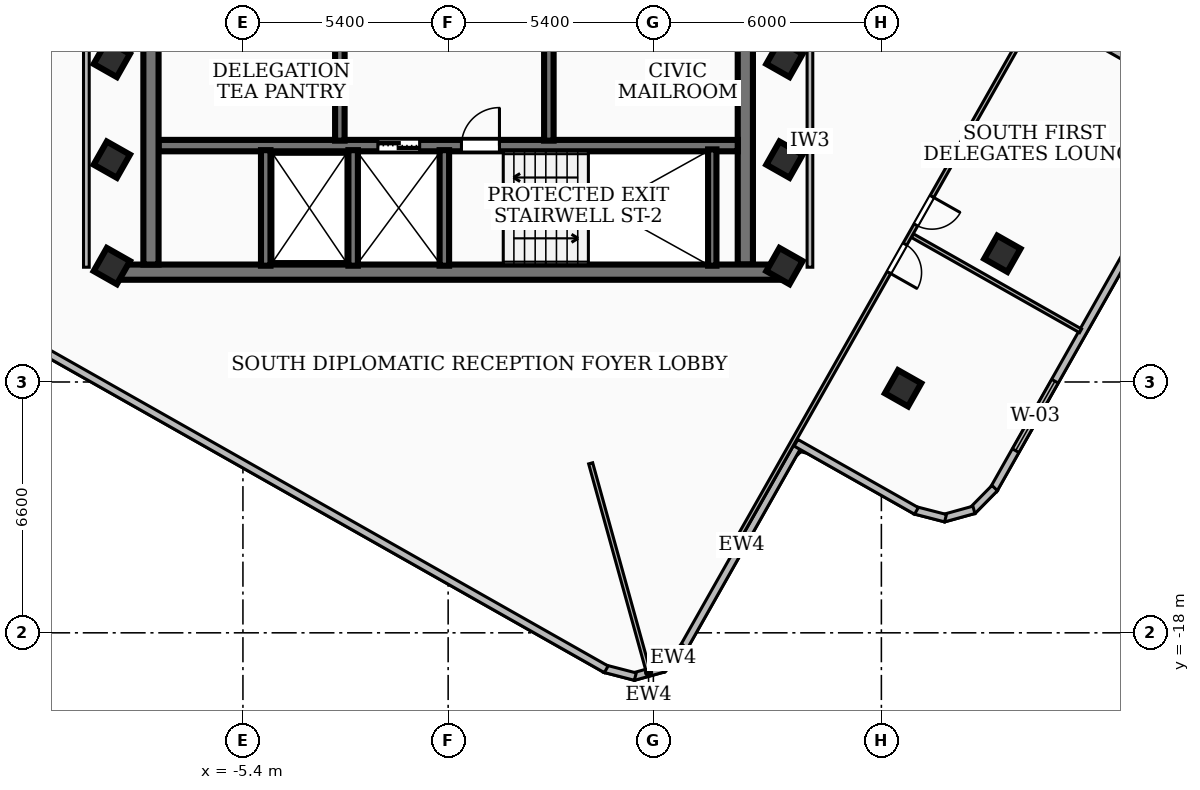
"""IFC4 building model, lengths in metres.
Left out: names, types, materials, properties, quantities, classifications, styles, units other than length and angle.
Written with IfcOpenShell. Run it as: python <this file> out.ifc"""

import sys

from ifc_helpers import new_model, si_unit, direction, frame, frame_2d, origin, origin_2d, place, context, subcontext, project, spatial, rectangle, extrude, element, fill, save


model = new_model("IFC4")
c1 = context("Model", 3, precision=1e-05, world=origin(), true_north=direction((0.0, 1.0)))
c2 = subcontext(c1, "Body", "Model", "MODEL_VIEW")
j1 = project(units=[si_unit("LENGTHUNIT", "METRE"), si_unit("PLANEANGLEUNIT", "RADIAN")], contexts=[c1])
p1 = place(None, origin())
s1 = spatial("IfcSite", under=j1, at=p1, CompositionType="ELEMENT")
p2 = place(p1, origin())
s2 = spatial("IfcBuilding", under=s1, at=p2, CompositionType="ELEMENT")
p3 = place(p2, frame((0.0, 0.0, 281.7)))
s3 = spatial("IfcBuildingStorey", under=s2, at=p3, CompositionType="ELEMENT", Elevation=281.7)
p4 = place(p3, frame((8.78, -8.51, 0.0), z_axis=(0.0, 0.0, 1.0), x_axis=(-1.0, 0.0, 0.0)))
e1 = element("IfcWall", 1, at=p4, inside=s3, PredefinedType="SHEAR", context=c2, shape_type="SweptSolid", body=[
    extrude(rectangle(XDim=17.56, YDim=0.4, at=frame_2d((8.78, 0.0))), origin(), (0.0, 0.0, 1.0), 3.12),
])
for number, where, z_axis, x_axis in (
    (2, (-7.82, -8.31, 0.0), (0.0, 0.0, 1.0), (0.0, 1.0, 0.0)),
    (3, (7.82, -1.95, 0.0), (0.0, 0.0, 1.0), (0.0, -1.0, 0.0)),
):
    element("IfcWall", number, at=place(p3, frame(where, z_axis=z_axis, x_axis=x_axis)), inside=s3, PredefinedType="SHEAR", context=c2, shape_type="SweptSolid", body=[
        extrude(rectangle(XDim=6.36, YDim=0.4, at=frame_2d((3.18, 0.0))), origin(), (0.0, 0.0, 1.0), 3.12),
    ])
p5 = place(p3, frame((-7.62, -5.18, 0.0), z_axis=(0.0, 0.0, 1.0), x_axis=(1.0, 0.0, 0.0)))
e4 = element("IfcWall", 4, at=p5, inside=s3, PredefinedType="SOLIDWALL", context=c2, shape_type="SweptSolid", body=[
    extrude(rectangle(XDim=15.24, YDim=0.3, at=frame_2d((7.62, 0.0))), origin(), (0.0, 0.0, 1.0), 3.12),
])
p6 = place(p5, frame((5.77, 0.0, 0.0)))
e5 = element("IfcOpeningElement", 5, at=p6, cuts=e4, PredefinedType="OPENING", context=c2, shape_type="SweptSolid", body=[
    extrude(rectangle(XDim=1.1, YDim=2.15, at=frame_2d((0.55, 1.075))), frame((0.0, 0.16, 0.0), z_axis=(0.0, -1.0, 0.0), x_axis=(1.0, 0.0, 0.0)), (0.0, 0.0, 1.0), 0.32),
])
p7 = place(p5, frame((7.97, 0.0, 0.0)))
e6 = element("IfcOpeningElement", 6, at=p7, cuts=e4, PredefinedType="OPENING", context=c2, shape_type="SweptSolid", body=[
    extrude(rectangle(XDim=1.0, YDim=2.1, at=frame_2d((0.5, 1.05))), frame((0.0, 0.16, 0.0), z_axis=(0.0, -1.0, 0.0), x_axis=(1.0, 0.0, 0.0)), (0.0, 0.0, 1.0), 0.32),
])
p8 = place(p3, frame((6.95, -8.34, 0.0), z_axis=(0.0, 0.0, 1.0), x_axis=(0.0, 1.0, 0.0)))
e7 = element("IfcWall", 7, at=p8, inside=s3, PredefinedType="SOLIDWALL", context=c2, shape_type="SweptSolid", body=[
    extrude(rectangle(XDim=3.06, YDim=0.22, at=frame_2d((1.53, 0.0))), origin(), (0.0, 0.0, 1.0), 3.12),
])
for number, where, z_axis, x_axis in (
    (8, (-0.1, -8.34, 0.0), (0.0, 0.0, 1.0), (0.0, 1.0, 0.0)),
    (9, (-2.5, -8.34, 0.0), (0.0, 0.0, 1.0), (0.0, 1.0, 0.0)),
    (10, (-4.8, -8.34, 0.0), (0.0, 0.0, 1.0), (0.0, 1.0, 0.0)),
):
    element("IfcWall", number, at=place(p3, frame(where, z_axis=z_axis, x_axis=x_axis)), inside=s3, PredefinedType="SOLIDWALL", context=c2, shape_type="SweptSolid", body=[
        extrude(rectangle(XDim=3.04, YDim=0.25, at=frame_2d((1.52, 0.0))), origin(), (0.0, 0.0, 1.0), 3.12),
    ])
for number, where, z_axis, x_axis in (
    (11, (-2.85, -5.05, 0.0), (0.0, 0.0, 1.0), (0.0, 1.0, 0.0)),
    (12, (2.65, -5.05, 0.0), (0.0, 0.0, 1.0), (0.0, 1.0, 0.0)),
):
    element("IfcWall", number, at=place(p3, frame(where, z_axis=z_axis, x_axis=x_axis)), inside=s3, PredefinedType="SOLIDWALL", context=c2, shape_type="SweptSolid", body=[
        extrude(rectangle(XDim=3.07, YDim=0.25, at=frame_2d((1.535, 0.0))), origin(), (0.0, 0.0, 1.0), 3.12),
    ])
for number, where, z_axis, x_axis in (
    (13, (-8.85, -5.55, 0.0), (0.0, 0.0, 1.0), (0.493, 0.87, 0.0)),
    (14, (-8.85, -2.9, 0.0), (0.0, 0.0, 1.0), (0.493, 0.87, 0.0)),
    (15, (8.85, -5.55, 0.0), (0.0, 0.0, 1.0), (0.493, 0.87, 0.0)),
    (16, (8.85, -2.9, 0.0), (0.0, 0.0, 1.0), (0.493, 0.87, 0.0)),
    (17, (8.85, -8.35, 0.0), (0.0, 0.0, 1.0), (0.493, 0.87, 0.0)),
    (18, (-8.85, -8.35, 0.0), (0.0, 0.0, 1.0), (0.493, 0.87, 0.0)),
    (19, (11.971, -11.566, 0.0), (0.0, 0.0, 1.0), (0.493, 0.87, 0.0)),
    (20, (14.583, -8.026, 0.0), (0.0, 0.0, 1.0), (0.493, 0.87, 0.0)),
):
    element("IfcColumn", number, at=place(p3, frame(where, z_axis=z_axis, x_axis=x_axis)), inside=s3, PredefinedType="COLUMN", context=c2, shape_type="SweptSolid", body=[
        extrude(rectangle(XDim=0.7, YDim=0.7, at=origin_2d()), origin(), (0.0, 0.0, 1.0), 3.42),
    ])
p9 = place(p3, frame((9.262, -12.968, 0.0), z_axis=(0.0, 0.0, 1.0), x_axis=(-0.492583125855, -0.87026539867, 0.0)))
e21 = element("IfcWall", 21, at=p9, inside=s3, PredefinedType="SOLIDWALL", context=c2, shape_type="SweptSolid", body=[
    extrude(rectangle(XDim=6.24, YDim=0.2, at=frame_2d((3.12, 0.0))), origin(), (0.0, 0.0, 1.0), 3.12),
])
p10 = place(p3, frame((6.218, -18.359, 0.0), z_axis=(0.0, 0.0, 1.0), x_axis=(-0.701706468749, -0.712466161804, 0.0)))
e22 = element("IfcWall", 22, at=p10, inside=s3, PredefinedType="SOLIDWALL", context=c2, shape_type="SweptSolid", body=[
    extrude(rectangle(XDim=0.84, YDim=0.2, at=frame_2d((0.42, 0.0))), origin(), (0.0, 0.0, 1.0), 3.12),
])
p11 = place(p3, frame((5.671, -18.932, 0.0), z_axis=(0.0, 0.0, 1.0), x_axis=(-0.963313924885, -0.268377126675, 0.0)))
e23 = element("IfcWall", 23, at=p11, inside=s3, PredefinedType="SOLIDWALL", context=c2, shape_type="SweptSolid", body=[
    extrude(rectangle(XDim=0.824, YDim=0.2, at=frame_2d((0.412, 0.0))), origin(), (0.0, 0.0, 1.0), 3.12),
])
p12 = place(p3, frame((4.925, -19.152, 0.0), z_axis=(0.0, 0.0, 1.0), x_axis=(-0.968015248239, 0.250891369276, 0.0)))
e24 = element("IfcWall", 24, at=p12, inside=s3, PredefinedType="SOLIDWALL", context=c2, shape_type="SweptSolid", body=[
    extrude(rectangle(XDim=0.838, YDim=0.2, at=frame_2d((0.419, 0.0))), origin(), (0.0, 0.0, 1.0), 3.12),
])
p13 = place(p3, frame((4.16, -18.96, 0.0), z_axis=(0.0, 0.0, 1.0), x_axis=(-0.870210232131, 0.492680577956, 0.0)))
e25 = element("IfcWall", 25, at=p13, inside=s3, PredefinedType="SOLIDWALL", context=c2, shape_type="SweptSolid", body=[
    extrude(rectangle(XDim=25.923, YDim=0.2, at=frame_2d((12.962, 0.0))), origin(), (0.0, 0.0, 1.0), 3.12),
])
p14 = place(p13, frame((19.32, 0.0, 0.85)))
e26 = element("IfcOpeningElement", 26, at=p14, cuts=e25, PredefinedType="OPENING", context=c2, shape_type="SweptSolid", body=[
    extrude(rectangle(XDim=1.8, YDim=1.6, at=frame_2d((0.9, 0.8))), frame((0.0, 0.11, 0.0), z_axis=(0.0, -1.0, 0.0), x_axis=(1.0, 0.0, 0.0)), (0.0, 0.0, 1.0), 0.22),
])
p15 = place(p3, frame((15.609, -1.599, 0.0), z_axis=(0.0, 0.0, 1.0), x_axis=(0.87036421417, -0.49240850388, 0.0)))
e27 = element("IfcWall", 27, at=p15, inside=s3, PredefinedType="SOLIDWALL", context=c2, shape_type="SweptSolid", body=[
    extrude(rectangle(XDim=3.641, YDim=0.2, at=frame_2d((1.821, 0.0))), origin(), (0.0, 0.0, 1.0), 3.12),
])
p16 = place(p3, frame((19.339, -5.421, 0.0), z_axis=(0.0, 0.0, 1.0), x_axis=(-0.492615794655, -0.870246906835, 0.0)))
e28 = element("IfcWall", 28, at=p16, inside=s3, PredefinedType="SOLIDWALL", context=c2, shape_type="SweptSolid", body=[
    extrude(rectangle(XDim=10.124, YDim=0.2, at=frame_2d((5.062, 0.0))), origin(), (0.0, 0.0, 1.0), 3.12),
])
p17 = place(p16, frame((6.846, 0.0, 0.85)))
e29 = element("IfcOpeningElement", 29, at=p17, cuts=e28, PredefinedType="OPENING", context=c2, shape_type="SweptSolid", body=[
    extrude(rectangle(XDim=2.1, YDim=2.0, at=frame_2d((1.05, 1.0))), frame((0.0, 0.11, 0.0), z_axis=(0.0, -1.0, 0.0), x_axis=(1.0, 0.0, 0.0)), (0.0, 0.0, 1.0), 0.22),
])
p18 = place(p3, frame((14.382, -14.191, 0.0), z_axis=(0.0, 0.0, 1.0), x_axis=(-0.701706468749, -0.712466161804, 0.0)))
e30 = element("IfcWall", 30, at=p18, inside=s3, PredefinedType="SOLIDWALL", context=c2, shape_type="SweptSolid", body=[
    extrude(rectangle(XDim=0.84, YDim=0.2, at=frame_2d((0.42, 0.0))), origin(), (0.0, 0.0, 1.0), 3.12),
])
p19 = place(p3, frame((13.835, -14.764, 0.0), z_axis=(0.0, 0.0, 1.0), x_axis=(-0.963780368541, -0.266697208862, 0.0)))
e31 = element("IfcWall", 31, at=p19, inside=s3, PredefinedType="SOLIDWALL", context=c2, shape_type="SweptSolid", body=[
    extrude(rectangle(XDim=0.825, YDim=0.2, at=frame_2d((0.412, 0.0))), origin(), (0.0, 0.0, 1.0), 3.12),
])
p20 = place(p3, frame((13.088, -14.983, 0.0), z_axis=(0.0, 0.0, 1.0), x_axis=(-0.968350107443, 0.249595812096, 0.0)))
e32 = element("IfcWall", 32, at=p20, inside=s3, PredefinedType="SOLIDWALL", context=c2, shape_type="SweptSolid", body=[
    extrude(rectangle(XDim=0.837, YDim=0.2, at=frame_2d((0.419, 0.0))), origin(), (0.0, 0.0, 1.0), 3.12),
])
p21 = place(p3, frame((12.323, -14.792, 0.0), z_axis=(0.0, 0.0, 1.0), x_axis=(-0.870412972764, 0.492322309918, 0.0)))
e33 = element("IfcWall", 33, at=p21, inside=s3, PredefinedType="SOLIDWALL", context=c2, shape_type="SweptSolid", body=[
    extrude(rectangle(XDim=3.642, YDim=0.2, at=frame_2d((1.821, 0.0))), origin(), (0.0, 0.0, 1.0), 3.12),
])
p22 = place(p3, frame((-9.52, -8.38, 0.0), z_axis=(0.0, 0.0, 1.0), x_axis=(0.0, 1.0, 0.0)))
e34 = element("IfcWall", 34, at=p22, inside=s3, PredefinedType="PARTITIONING", context=c2, shape_type="SweptSolid", body=[
    extrude(rectangle(XDim=6.63, YDim=0.15, at=frame_2d((3.315, 0.0))), origin(), (0.0, 0.0, 1.0), 3.12),
])
p23 = place(p3, frame((9.52, -8.38, 0.0), z_axis=(0.0, 0.0, 1.0), x_axis=(0.0, 1.0, 0.0)))
e35 = element("IfcWall", 35, at=p23, inside=s3, PredefinedType="PARTITIONING", context=c2, shape_type="SweptSolid", body=[
    extrude(rectangle(XDim=6.63, YDim=0.15, at=frame_2d((3.315, 0.0))), origin(), (0.0, 0.0, 1.0), 2.49),
])
p24 = place(p3, frame((3.75, -13.54, 0.0), z_axis=(0.0, 0.0, 1.0), x_axis=(0.266822842302, -0.963745594452, 0.0)))
e36 = element("IfcWall", 36, at=p24, inside=s3, PredefinedType="PARTITIONING", context=c2, shape_type="SweptSolid", body=[
    extrude(rectangle(XDim=5.645, YDim=0.11, at=frame_2d((2.822, 0.0))), origin(), (0.0, 0.0, 1.0), 3.12),
])
p25 = place(p3, frame((12.216, -7.549, 0.0), z_axis=(0.0, 0.0, 1.0), x_axis=(0.870245204201, -0.492618802488, 0.0)))
e37 = element("IfcWall", 37, at=p25, inside=s3, PredefinedType="PARTITIONING", context=c2, shape_type="SweptSolid", body=[
    extrude(rectangle(XDim=5.085, YDim=0.11, at=frame_2d((2.542, 0.0))), origin(), (0.0, 0.0, 1.0), 2.49),
])
p26 = place(p3, frame((17.619, 2.113, 0.0), z_axis=(0.0, 0.0, 1.0), x_axis=(-0.492746831558, -0.870172718482, 0.0)))
e38 = element("IfcWall", 38, at=p26, inside=s3, PredefinedType="PARTITIONING", context=c2, shape_type="SweptSolid", body=[
    extrude(rectangle(XDim=20.54, YDim=0.11, at=frame_2d((10.27, 0.0))), origin(), (0.0, 0.0, 1.0), 2.49),
])
p27 = place(p26, frame((11.36, 0.0, 0.0)))
e39 = element("IfcOpeningElement", 39, at=p27, cuts=e38, PredefinedType="OPENING", context=c2, shape_type="SweptSolid", body=[
    extrude(rectangle(XDim=0.86, YDim=2.04, at=frame_2d((0.43, 1.02))), frame((0.0, 0.065, 0.0), z_axis=(0.0, -1.0, 0.0), x_axis=(1.0, 0.0, 0.0)), (0.0, 0.0, 1.0), 0.13),
])
p28 = place(p26, frame((9.92, 0.0, 0.0)))
e40 = element("IfcOpeningElement", 40, at=p28, cuts=e38, PredefinedType="OPENING", context=c2, shape_type="SweptSolid", body=[
    extrude(rectangle(XDim=0.86, YDim=2.04, at=frame_2d((0.43, 1.02))), frame((0.0, 0.065, 0.0), z_axis=(0.0, -1.0, 0.0), x_axis=(1.0, 0.0, 0.0)), (0.0, 0.0, 1.0), 0.13),
])
p29 = place(p17, origin())
e41 = element("IfcWindow", 41, at=p29, inside=s3, PartitioningType="SINGLE_PANEL", PredefinedType="WINDOW", context=c2, shape_type="SweptSolid", body=[
    extrude(rectangle(XDim=2.1, YDim=2.0, at=frame_2d((1.05, 1.0))), frame((0.0, 0.03, 0.0), z_axis=(0.0, -1.0, 0.0), x_axis=(1.0, 0.0, 0.0)), (0.0, 0.0, 1.0), 0.06),
])
fill(e29, e41)
p30 = place(p6, origin())
e42 = element("IfcDoor", 42, at=p30, inside=s3, OperationType="DOUBLE_DOOR_SLIDING", PredefinedType="DOOR", context=c2, shape_type="SweptSolid", body=[
    extrude(rectangle(XDim=1.1, YDim=2.15, at=frame_2d((0.55, 1.075))), frame((0.0, 0.025, 0.0), z_axis=(0.0, -1.0, 0.0), x_axis=(1.0, 0.0, 0.0)), (0.0, 0.0, 1.0), 0.05),
])
fill(e5, e42)
p31 = place(p7, origin())
e43 = element("IfcDoor", 43, at=p31, inside=s3, OperationType="SINGLE_SWING_RIGHT", PredefinedType="DOOR", context=c2, shape_type="SweptSolid", body=[
    extrude(rectangle(XDim=1.0, YDim=2.1, at=frame_2d((0.5, 1.05))), frame((0.0, 0.025, 0.0), z_axis=(0.0, -1.0, 0.0), x_axis=(1.0, 0.0, 0.0)), (0.0, 0.0, 1.0), 0.05),
])
fill(e6, e43)
p32 = place(p27, origin())
e44 = element("IfcDoor", 44, at=p32, inside=s3, OperationType="SINGLE_SWING_RIGHT", PredefinedType="DOOR", context=c2, shape_type="SweptSolid", body=[
    extrude(rectangle(XDim=0.86, YDim=2.04, at=frame_2d((0.43, 1.02))), frame((0.0, 0.025, 0.0), z_axis=(0.0, -1.0, 0.0), x_axis=(1.0, 0.0, 0.0)), (0.0, 0.0, 1.0), 0.05),
])
fill(e39, e44)
p33 = place(p28, origin())
e45 = element("IfcDoor", 45, at=p33, inside=s3, OperationType="SINGLE_SWING_LEFT", PredefinedType="DOOR", context=c2, shape_type="SweptSolid", body=[
    extrude(rectangle(XDim=0.86, YDim=2.04, at=frame_2d((0.43, 1.02))), frame((0.0, 0.025, 0.0), z_axis=(0.0, -1.0, 0.0), x_axis=(1.0, 0.0, 0.0)), (0.0, 0.0, 1.0), 0.05),
])
fill(e40, e45)
save(model, sys.argv[1])
